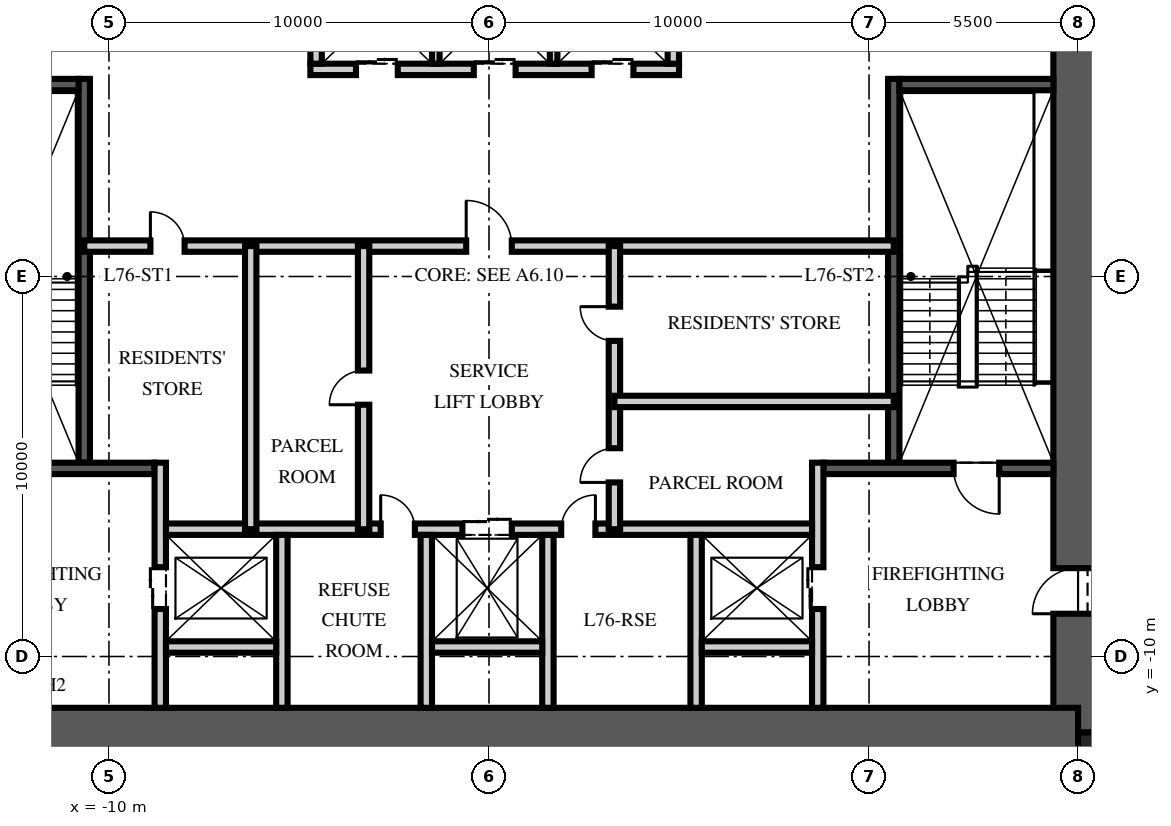
"""IFC4 building model, lengths in metres.
Left out: names, types, materials, properties, quantities, classifications, styles, units other than length and angle.
Written with IfcOpenShell. Run it as: python <this file> out.ifc"""

import sys

from ifc_helpers import new_model, si_unit, direction, frame, frame_2d, origin, origin_2d, place, context, subcontext, project, spatial, rectangle, extrude, element, fill, save


model = new_model("IFC4")
c1 = context("Model", 3, precision=1e-05, world=origin(), true_north=direction((0.0, 1.0)))
c2 = subcontext(c1, "Body", "Model", "MODEL_VIEW")
j1 = project(units=[si_unit("LENGTHUNIT", "METRE"), si_unit("PLANEANGLEUNIT", "RADIAN")], contexts=[c1])
p1 = place(None, origin())
s1 = spatial("IfcSite", under=j1, at=p1, CompositionType="ELEMENT")
p2 = place(p1, origin())
s2 = spatial("IfcBuilding", under=s1, at=p2, CompositionType="ELEMENT")
p3 = place(p2, frame((0.0, 0.0, 304.5)))
s3 = spatial("IfcBuildingStorey", under=s2, at=p3, CompositionType="ELEMENT", Elevation=304.5)
p4 = place(p3, frame((15.5, -12.0, -0.25), z_axis=(0.0, 0.0, 1.0), x_axis=(0.0, 1.0, 0.0)))
e1 = element("IfcWall", 1, at=p4, inside=s3, PredefinedType="SHEAR", context=c2, shape_type="SweptSolid", body=[
    extrude(rectangle(XDim=24.0, YDim=1.3, at=frame_2d((12.0, 0.0))), origin(), (0.0, 0.0, 1.0), 3.75),
])
p5 = place(p4, frame((3.125, 0.0, 0.25)))
e2 = element("IfcOpeningElement", 2, at=p5, cuts=e1, PredefinedType="OPENING", context=c2, shape_type="SweptSolid", body=[
    extrude(rectangle(XDim=1.2, YDim=2.1, at=frame_2d((0.6, 1.05))), frame((0.0, 0.66, 0.0), z_axis=(0.0, -1.0, 0.0), x_axis=(1.0, 0.0, 0.0)), (0.0, 0.0, 1.0), 1.32),
])
p6 = place(p4, frame((19.375, 0.0, 0.25)))
e3 = element("IfcOpeningElement", 3, at=p6, cuts=e1, PredefinedType="OPENING", context=c2, shape_type="SweptSolid", body=[
    extrude(rectangle(XDim=1.8, YDim=2.1, at=frame_2d((0.9, 1.05))), frame((0.0, 0.66, 0.0), z_axis=(0.0, -1.0, 0.0), x_axis=(1.0, 0.0, 0.0)), (0.0, 0.0, 1.0), 1.32),
])
p7 = place(p3, frame((-15.5, -12.0, -0.25), z_axis=(0.0, 0.0, 1.0), x_axis=(1.0, 0.0, 0.0)))
e4 = element("IfcWall", 4, at=p7, inside=s3, PredefinedType="SHEAR", context=c2, shape_type="SweptSolid", body=[
    extrude(rectangle(XDim=31.0, YDim=1.3, at=frame_2d((15.5, 0.0))), origin(), (0.0, 0.0, 1.0), 3.75),
])
p8 = place(p3, frame((15.825, -12.325, -0.25), z_axis=(0.0, 0.0, 1.0), x_axis=(1.0, 0.0, 0.0)))
e5 = element("IfcColumn", 5, at=p8, inside=s3, PredefinedType="COLUMN", context=c2, shape_type="SweptSolid", body=[
    extrude(rectangle(XDim=0.65, YDim=0.65, at=origin_2d()), origin(), (0.0, 0.0, 1.0), 3.75),
])
p9 = place(p3, frame((-10.65, -4.9, 0.0), z_axis=(0.0, 0.0, 1.0), x_axis=(0.0, 1.0, 0.0)))
e6 = element("IfcWall", 6, at=p9, inside=s3, PredefinedType="SOLIDWALL", context=c2, shape_type="SweptSolid", body=[
    extrude(rectangle(XDim=10.1, YDim=0.3, at=frame_2d((5.05, 0.0))), origin(), (0.0, 0.0, 1.0), 3.5),
])
p10 = place(p3, frame((-14.85, -5.05, 0.0), z_axis=(0.0, 0.0, 1.0), x_axis=(1.0, 0.0, 0.0)))
e7 = element("IfcWall", 7, at=p10, inside=s3, PredefinedType="SOLIDWALL", context=c2, shape_type="SweptSolid", body=[
    extrude(rectangle(XDim=6.05, YDim=0.3, at=frame_2d((3.025, 0.0))), origin(), (0.0, 0.0, 1.0), 3.5),
])
p11 = place(p10, frame((1.425, 0.0, 0.0)))
e8 = element("IfcOpeningElement", 8, at=p11, cuts=e7, PredefinedType="OPENING", context=c2, shape_type="SweptSolid", body=[
    extrude(rectangle(XDim=1.2, YDim=2.1, at=frame_2d((0.6, 1.05))), frame((0.0, 0.16, 0.0), z_axis=(0.0, -1.0, 0.0), x_axis=(1.0, 0.0, 0.0)), (0.0, 0.0, 1.0), 0.32),
])
p12 = place(p3, frame((-14.85, 5.05, 0.0), z_axis=(0.0, 0.0, 1.0), x_axis=(1.0, 0.0, 0.0)))
e9 = element("IfcWall", 9, at=p12, inside=s3, PredefinedType="SOLIDWALL", context=c2, shape_type="SweptSolid", body=[
    extrude(rectangle(XDim=4.05, YDim=0.3, at=frame_2d((2.025, 0.0))), origin(), (0.0, 0.0, 1.0), 3.5),
])
p13 = place(p3, frame((-8.65, -11.35, 0.0), z_axis=(0.0, 0.0, 1.0), x_axis=(0.0, 1.0, 0.0)))
e10 = element("IfcWall", 10, at=p13, inside=s3, PredefinedType="PARTITIONING", context=c2, shape_type="SweptSolid", body=[
    extrude(rectangle(XDim=6.45, YDim=0.3, at=frame_2d((3.225, 0.0))), origin(), (0.0, 0.0, 1.0), 3.5),
])
p14 = place(p13, frame((2.6, 0.0, 0.0)))
e11 = element("IfcOpeningElement", 11, at=p14, cuts=e10, PredefinedType="OPENING", context=c2, shape_type="SweptSolid", body=[
    extrude(rectangle(XDim=1.1, YDim=2.1, at=frame_2d((0.55, 1.05))), frame((0.0, 0.16, 0.0), z_axis=(0.0, -1.0, 0.0), x_axis=(1.0, 0.0, 0.0)), (0.0, 0.0, 1.0), 0.32),
])
p15 = place(p3, frame((10.65, -4.9, 0.0), z_axis=(0.0, 0.0, 1.0), x_axis=(0.0, 1.0, 0.0)))
e12 = element("IfcWall", 12, at=p15, inside=s3, PredefinedType="SOLIDWALL", context=c2, shape_type="SweptSolid", body=[
    extrude(rectangle(XDim=10.1, YDim=0.3, at=frame_2d((5.05, 0.0))), origin(), (0.0, 0.0, 1.0), 3.5),
])
p16 = place(p3, frame((14.85, -5.05, 0.0), z_axis=(0.0, 0.0, 1.0), x_axis=(-1.0, 0.0, 0.0)))
e13 = element("IfcWall", 13, at=p16, inside=s3, PredefinedType="SOLIDWALL", context=c2, shape_type="SweptSolid", body=[
    extrude(rectangle(XDim=6.05, YDim=0.3, at=frame_2d((3.025, 0.0))), origin(), (0.0, 0.0, 1.0), 3.5),
])
p17 = place(p16, frame((1.425, 0.0, 0.0)))
e14 = element("IfcOpeningElement", 14, at=p17, cuts=e13, PredefinedType="OPENING", context=c2, shape_type="SweptSolid", body=[
    extrude(rectangle(XDim=1.2, YDim=2.1, at=frame_2d((0.6, 1.05))), frame((0.0, 0.16, 0.0), z_axis=(0.0, -1.0, 0.0), x_axis=(1.0, 0.0, 0.0)), (0.0, 0.0, 1.0), 0.32),
])
p18 = place(p3, frame((14.85, 5.05, 0.0), z_axis=(0.0, 0.0, 1.0), x_axis=(-1.0, 0.0, 0.0)))
e15 = element("IfcWall", 15, at=p18, inside=s3, PredefinedType="SOLIDWALL", context=c2, shape_type="SweptSolid", body=[
    extrude(rectangle(XDim=4.05, YDim=0.3, at=frame_2d((2.025, 0.0))), origin(), (0.0, 0.0, 1.0), 3.5),
])
p19 = place(p3, frame((8.65, -11.35, 0.0), z_axis=(0.0, 0.0, 1.0), x_axis=(0.0, 1.0, 0.0)))
e16 = element("IfcWall", 16, at=p19, inside=s3, PredefinedType="PARTITIONING", context=c2, shape_type="SweptSolid", body=[
    extrude(rectangle(XDim=6.45, YDim=0.3, at=frame_2d((3.225, 0.0))), origin(), (0.0, 0.0, 1.0), 3.5),
])
p20 = place(p19, frame((2.6, 0.0, 0.0)))
e17 = element("IfcOpeningElement", 17, at=p20, cuts=e16, PredefinedType="OPENING", context=c2, shape_type="SweptSolid", body=[
    extrude(rectangle(XDim=1.1, YDim=2.1, at=frame_2d((0.55, 1.05))), frame((0.0, 0.16, 0.0), z_axis=(0.0, -1.0, 0.0), x_axis=(1.0, 0.0, 0.0)), (0.0, 0.0, 1.0), 0.32),
])
p21 = place(p3, frame((-8.5, -6.65, 0.0), z_axis=(0.0, 0.0, 1.0), x_axis=(1.0, 0.0, 0.0)))
e18 = element("IfcWall", 18, at=p21, inside=s3, PredefinedType="PARTITIONING", context=c2, shape_type="SweptSolid", body=[
    extrude(rectangle(XDim=17.0, YDim=0.3, at=frame_2d((8.5, 0.0))), origin(), (0.0, 0.0, 1.0), 3.5),
])
p22 = place(p21, frame((7.8, 0.0, 0.0)))
e19 = element("IfcOpeningElement", 19, at=p22, cuts=e18, PredefinedType="OPENING", context=c2, shape_type="SweptSolid", body=[
    extrude(rectangle(XDim=1.3, YDim=2.4, at=frame_2d((0.65, 1.2))), frame((0.0, 0.16, 0.0), z_axis=(0.0, -1.0, 0.0), x_axis=(1.0, 0.0, 0.0)), (0.0, 0.0, 1.0), 0.32),
])
p23 = place(p21, frame((5.65, 0.0, 0.0)))
e20 = element("IfcOpeningElement", 20, at=p23, cuts=e18, PredefinedType="OPENING", context=c2, shape_type="SweptSolid", body=[
    extrude(rectangle(XDim=0.9, YDim=2.1, at=frame_2d((0.45, 1.05))), frame((0.0, 0.16, 0.0), z_axis=(0.0, -1.0, 0.0), x_axis=(1.0, 0.0, 0.0)), (0.0, 0.0, 1.0), 0.32),
])
p24 = place(p21, frame((10.4, 0.0, 0.0)))
e21 = element("IfcOpeningElement", 21, at=p24, cuts=e18, PredefinedType="OPENING", context=c2, shape_type="SweptSolid", body=[
    extrude(rectangle(XDim=0.9, YDim=2.1, at=frame_2d((0.45, 1.05))), frame((0.0, 0.16, 0.0), z_axis=(0.0, -1.0, 0.0), x_axis=(1.0, 0.0, 0.0)), (0.0, 0.0, 1.0), 0.32),
])
for number, where, z_axis, x_axis in (
    (22, (-5.45, -11.35, 0.0), (0.0, 0.0, 1.0), (0.0, 1.0, 0.0)),
    (23, (-1.65, -11.35, 0.0), (0.0, 0.0, 1.0), (0.0, 1.0, 0.0)),
    (24, (1.55, -11.35, 0.0), (0.0, 0.0, 1.0), (0.0, 1.0, 0.0)),
    (25, (5.45, -11.35, 0.0), (0.0, 0.0, 1.0), (0.0, 1.0, 0.0)),
):
    element("IfcWall", number, at=place(p3, frame(where, z_axis=z_axis, x_axis=x_axis)), inside=s3, PredefinedType="PARTITIONING", context=c2, shape_type="SweptSolid", body=[
        extrude(rectangle(XDim=4.55, YDim=0.3, at=frame_2d((2.275, 0.0))), origin(), (0.0, 0.0, 1.0), 3.5),
    ])
for number, where, z_axis, x_axis in (
    (26, (-8.5, -9.75, 0.0), (0.0, 0.0, 1.0), (1.0, 0.0, 0.0)),
    (27, (-1.5, -9.75, 0.0), (0.0, 0.0, 1.0), (1.0, 0.0, 0.0)),
    (28, (5.6, -9.75, 0.0), (0.0, 0.0, 1.0), (1.0, 0.0, 0.0)),
):
    element("IfcWall", number, at=place(p3, frame(where, z_axis=z_axis, x_axis=x_axis)), inside=s3, PredefinedType="PARTITIONING", context=c2, shape_type="SweptSolid", body=[
        extrude(rectangle(XDim=2.9, YDim=0.3, at=frame_2d((1.45, 0.0))), origin(), (0.0, 0.0, 1.0), 3.5),
    ])
p25 = place(p3, frame((-4.7, 5.45, 0.0), z_axis=(0.0, 0.0, 1.0), x_axis=(1.0, 0.0, 0.0)))
e29 = element("IfcWall", 29, at=p25, inside=s3, PredefinedType="PARTITIONING", context=c2, shape_type="SweptSolid", body=[
    extrude(rectangle(XDim=9.7, YDim=0.3, at=frame_2d((4.85, 0.0))), origin(), (0.0, 0.0, 1.0), 3.5),
])
p26 = place(p25, frame((1.2, 0.0, 0.0)))
e30 = element("IfcOpeningElement", 30, at=p26, cuts=e29, PredefinedType="OPENING", context=c2, shape_type="SweptSolid", body=[
    extrude(rectangle(XDim=1.1, YDim=2.1, at=frame_2d((0.55, 1.05))), frame((0.0, 0.16, 0.0), z_axis=(0.0, -1.0, 0.0), x_axis=(1.0, 0.0, 0.0)), (0.0, 0.0, 1.0), 0.32),
])
p27 = place(p25, frame((4.3, 0.0, 0.0)))
e31 = element("IfcOpeningElement", 31, at=p27, cuts=e29, PredefinedType="OPENING", context=c2, shape_type="SweptSolid", body=[
    extrude(rectangle(XDim=1.1, YDim=2.1, at=frame_2d((0.55, 1.05))), frame((0.0, 0.16, 0.0), z_axis=(0.0, -1.0, 0.0), x_axis=(1.0, 0.0, 0.0)), (0.0, 0.0, 1.0), 0.32),
])
p28 = place(p25, frame((7.4, 0.0, 0.0)))
e32 = element("IfcOpeningElement", 32, at=p28, cuts=e29, PredefinedType="OPENING", context=c2, shape_type="SweptSolid", body=[
    extrude(rectangle(XDim=1.1, YDim=2.1, at=frame_2d((0.55, 1.05))), frame((0.0, 0.16, 0.0), z_axis=(0.0, -1.0, 0.0), x_axis=(1.0, 0.0, 0.0)), (0.0, 0.0, 1.0), 0.32),
])
for number, where, z_axis, x_axis in (
    (33, (-4.55, 5.6, 0.0), (0.0, 0.0, 1.0), (0.0, 1.0, 0.0)),
    (34, (4.85, 5.6, 0.0), (0.0, 0.0, 1.0), (0.0, 1.0, 0.0)),
):
    element("IfcWall", number, at=place(p3, frame(where, z_axis=z_axis, x_axis=x_axis)), inside=s3, PredefinedType="PARTITIONING", context=c2, shape_type="SweptSolid", body=[
        extrude(rectangle(XDim=2.8, YDim=0.3, at=frame_2d((1.4, 0.0))), origin(), (0.0, 0.0, 1.0), 3.5),
    ])
for number, where, z_axis, x_axis in (
    (35, (-1.4, 5.6, 0.0), (0.0, 0.0, 1.0), (0.0, 1.0, 0.0)),
    (36, (1.7, 5.6, 0.0), (0.0, 0.0, 1.0), (0.0, 1.0, 0.0)),
):
    element("IfcWall", number, at=place(p3, frame(where, z_axis=z_axis, x_axis=x_axis)), inside=s3, PredefinedType="PARTITIONING", context=c2, shape_type="SweptSolid", body=[
        extrude(rectangle(XDim=2.8, YDim=0.2, at=frame_2d((1.4, 0.0))), origin(), (0.0, 0.0, 1.0), 3.5),
    ])
p29 = place(p3, frame((-10.65, 0.8, 0.0), z_axis=(0.0, 0.0, 1.0), x_axis=(1.0, 0.0, 0.0)))
e37 = element("IfcWall", 37, at=p29, inside=s3, PredefinedType="PARTITIONING", context=c2, shape_type="SweptSolid", body=[
    extrude(rectangle(XDim=21.3, YDim=0.3, at=frame_2d((10.65, 0.0))), origin(), (0.0, 0.0, 1.0), 3.5),
])
p30 = place(p29, frame((10.05, 0.0, 0.0)))
e38 = element("IfcOpeningElement", 38, at=p30, cuts=e37, PredefinedType="OPENING", context=c2, shape_type="SweptSolid", body=[
    extrude(rectangle(XDim=1.2, YDim=2.1, at=frame_2d((0.6, 1.05))), frame((0.0, 0.16, 0.0), z_axis=(0.0, -1.0, 0.0), x_axis=(1.0, 0.0, 0.0)), (0.0, 0.0, 1.0), 0.32),
])
p31 = place(p29, frame((1.74, 0.0, 0.0)))
e39 = element("IfcOpeningElement", 39, at=p31, cuts=e37, PredefinedType="OPENING", context=c2, shape_type="SweptSolid", body=[
    extrude(rectangle(XDim=0.9, YDim=2.1, at=frame_2d((0.45, 1.05))), frame((0.0, 0.16, 0.0), z_axis=(0.0, -1.0, 0.0), x_axis=(1.0, 0.0, 0.0)), (0.0, 0.0, 1.0), 0.32),
])
p32 = place(p3, frame((-3.3, -6.65, 0.0), z_axis=(0.0, 0.0, 1.0), x_axis=(0.0, 1.0, 0.0)))
e40 = element("IfcWall", 40, at=p32, inside=s3, PredefinedType="PARTITIONING", context=c2, shape_type="SweptSolid", body=[
    extrude(rectangle(XDim=7.45, YDim=0.3, at=frame_2d((3.725, 0.0))), origin(), (0.0, 0.0, 1.0), 3.5),
])
p33 = place(p32, frame((3.275, 0.0, 0.0)))
e41 = element("IfcOpeningElement", 41, at=p33, cuts=e40, PredefinedType="OPENING", context=c2, shape_type="SweptSolid", body=[
    extrude(rectangle(XDim=0.9, YDim=2.1, at=frame_2d((0.45, 1.05))), frame((0.0, 0.16, 0.0), z_axis=(0.0, -1.0, 0.0), x_axis=(1.0, 0.0, 0.0)), (0.0, 0.0, 1.0), 0.32),
])
p34 = place(p3, frame((3.3, -6.65, 0.0), z_axis=(0.0, 0.0, 1.0), x_axis=(0.0, 1.0, 0.0)))
e42 = element("IfcWall", 42, at=p34, inside=s3, PredefinedType="PARTITIONING", context=c2, shape_type="SweptSolid", body=[
    extrude(rectangle(XDim=7.45, YDim=0.3, at=frame_2d((3.725, 0.0))), origin(), (0.0, 0.0, 1.0), 3.5),
])
p35 = place(p34, frame((1.231, 0.0, 0.0)))
e43 = element("IfcOpeningElement", 43, at=p35, cuts=e42, PredefinedType="OPENING", context=c2, shape_type="SweptSolid", body=[
    extrude(rectangle(XDim=0.9, YDim=2.1, at=frame_2d((0.45, 1.05))), frame((0.0, 0.16, 0.0), z_axis=(0.0, -1.0, 0.0), x_axis=(1.0, 0.0, 0.0)), (0.0, 0.0, 1.0), 0.32),
])
p36 = place(p34, frame((4.956, 0.0, 0.0)))
e44 = element("IfcOpeningElement", 44, at=p36, cuts=e42, PredefinedType="OPENING", context=c2, shape_type="SweptSolid", body=[
    extrude(rectangle(XDim=0.9, YDim=2.1, at=frame_2d((0.45, 1.05))), frame((0.0, 0.16, 0.0), z_axis=(0.0, -1.0, 0.0), x_axis=(1.0, 0.0, 0.0)), (0.0, 0.0, 1.0), 0.32),
])
p37 = place(p3, frame((-6.27, -6.65, 0.0), z_axis=(0.0, 0.0, 1.0), x_axis=(0.0, 1.0, 0.0)))
e45 = element("IfcWall", 45, at=p37, inside=s3, PredefinedType="PARTITIONING", context=c2, shape_type="SweptSolid", body=[
    extrude(rectangle(XDim=7.45, YDim=0.3, at=frame_2d((3.725, 0.0))), origin(), (0.0, 0.0, 1.0), 3.5),
])
p38 = place(p3, frame((10.65, -3.288, 0.0), z_axis=(0.0, 0.0, 1.0), x_axis=(-1.0, 0.0, 0.0)))
e46 = element("IfcWall", 46, at=p38, inside=s3, PredefinedType="PARTITIONING", context=c2, shape_type="SweptSolid", body=[
    extrude(rectangle(XDim=7.35, YDim=0.3, at=frame_2d((3.675, 0.0))), origin(), (0.0, 0.0, 1.0), 3.5),
])
p39 = place(p17, origin())
e47 = element("IfcDoor", 47, at=p39, inside=s3, OperationType="SINGLE_SWING_LEFT", PredefinedType="DOOR", context=c2, shape_type="SweptSolid", body=[
    extrude(rectangle(XDim=1.2, YDim=2.1, at=frame_2d((0.6, 1.05))), frame((0.0, 0.025, 0.0), z_axis=(0.0, -1.0, 0.0), x_axis=(1.0, 0.0, 0.0)), (0.0, 0.0, 1.0), 0.05),
])
fill(e14, e47)
p40 = place(p5, origin())
e48 = element("IfcDoor", 48, at=p40, inside=s3, OperationType="SINGLE_SWING_LEFT", PredefinedType="DOOR", context=c2, shape_type="SweptSolid", body=[
    extrude(rectangle(XDim=1.2, YDim=2.1, at=frame_2d((0.6, 1.05))), frame((0.0, 0.025, 0.0), z_axis=(0.0, -1.0, 0.0), x_axis=(1.0, 0.0, 0.0)), (0.0, 0.0, 1.0), 0.05),
])
fill(e2, e48)
p41 = place(p14, origin())
e49 = element("IfcDoor", 49, at=p41, inside=s3, OperationType="DOUBLE_DOOR_SLIDING", PredefinedType="DOOR", context=c2, shape_type="SweptSolid", body=[
    extrude(rectangle(XDim=1.1, YDim=2.1, at=frame_2d((0.55, 1.05))), frame((0.0, 0.025, 0.0), z_axis=(0.0, -1.0, 0.0), x_axis=(1.0, 0.0, 0.0)), (0.0, 0.0, 1.0), 0.05),
])
fill(e11, e49)
p42 = place(p20, origin())
e50 = element("IfcDoor", 50, at=p42, inside=s3, OperationType="DOUBLE_DOOR_SLIDING", PredefinedType="DOOR", context=c2, shape_type="SweptSolid", body=[
    extrude(rectangle(XDim=1.1, YDim=2.1, at=frame_2d((0.55, 1.05))), frame((0.0, 0.025, 0.0), z_axis=(0.0, -1.0, 0.0), x_axis=(1.0, 0.0, 0.0)), (0.0, 0.0, 1.0), 0.05),
])
fill(e17, e50)
p43 = place(p26, origin())
e51 = element("IfcDoor", 51, at=p43, inside=s3, OperationType="DOUBLE_DOOR_SLIDING", PredefinedType="DOOR", context=c2, shape_type="SweptSolid", body=[
    extrude(rectangle(XDim=1.1, YDim=2.1, at=frame_2d((0.55, 1.05))), frame((0.0, 0.025, 0.0), z_axis=(0.0, -1.0, 0.0), x_axis=(1.0, 0.0, 0.0)), (0.0, 0.0, 1.0), 0.05),
])
fill(e30, e51)
p44 = place(p27, origin())
e52 = element("IfcDoor", 52, at=p44, inside=s3, OperationType="DOUBLE_DOOR_SLIDING", PredefinedType="DOOR", context=c2, shape_type="SweptSolid", body=[
    extrude(rectangle(XDim=1.1, YDim=2.1, at=frame_2d((0.55, 1.05))), frame((0.0, 0.025, 0.0), z_axis=(0.0, -1.0, 0.0), x_axis=(1.0, 0.0, 0.0)), (0.0, 0.0, 1.0), 0.05),
])
fill(e31, e52)
p45 = place(p28, origin())
e53 = element("IfcDoor", 53, at=p45, inside=s3, OperationType="DOUBLE_DOOR_SLIDING", PredefinedType="DOOR", context=c2, shape_type="SweptSolid", body=[
    extrude(rectangle(XDim=1.1, YDim=2.1, at=frame_2d((0.55, 1.05))), frame((0.0, 0.025, 0.0), z_axis=(0.0, -1.0, 0.0), x_axis=(1.0, 0.0, 0.0)), (0.0, 0.0, 1.0), 0.05),
])
fill(e32, e53)
p46 = place(p22, origin())
e54 = element("IfcDoor", 54, at=p46, inside=s3, OperationType="DOUBLE_DOOR_SLIDING", PredefinedType="DOOR", context=c2, shape_type="SweptSolid", body=[
    extrude(rectangle(XDim=1.3, YDim=2.4, at=frame_2d((0.65, 1.2))), frame((0.0, 0.025, 0.0), z_axis=(0.0, -1.0, 0.0), x_axis=(1.0, 0.0, 0.0)), (0.0, 0.0, 1.0), 0.05),
])
fill(e19, e54)
p47 = place(p30, origin())
e55 = element("IfcDoor", 55, at=p47, inside=s3, OperationType="SINGLE_SWING_LEFT", PredefinedType="DOOR", context=c2, shape_type="SweptSolid", body=[
    extrude(rectangle(XDim=1.2, YDim=2.1, at=frame_2d((0.6, 1.05))), frame((0.0, 0.025, 0.0), z_axis=(0.0, -1.0, 0.0), x_axis=(1.0, 0.0, 0.0)), (0.0, 0.0, 1.0), 0.05),
])
fill(e38, e55)
p48 = place(p23, origin())
e56 = element("IfcDoor", 56, at=p48, inside=s3, OperationType="SINGLE_SWING_LEFT", PredefinedType="DOOR", context=c2, shape_type="SweptSolid", body=[
    extrude(rectangle(XDim=0.9, YDim=2.1, at=frame_2d((0.45, 1.05))), frame((0.0, 0.025, 0.0), z_axis=(0.0, -1.0, 0.0), x_axis=(1.0, 0.0, 0.0)), (0.0, 0.0, 1.0), 0.05),
])
fill(e20, e56)
p49 = place(p24, origin())
e57 = element("IfcDoor", 57, at=p49, inside=s3, OperationType="SINGLE_SWING_RIGHT", PredefinedType="DOOR", context=c2, shape_type="SweptSolid", body=[
    extrude(rectangle(XDim=0.9, YDim=2.1, at=frame_2d((0.45, 1.05))), frame((0.0, 0.025, 0.0), z_axis=(0.0, -1.0, 0.0), x_axis=(1.0, 0.0, 0.0)), (0.0, 0.0, 1.0), 0.05),
])
fill(e21, e57)
p50 = place(p33, origin())
e58 = element("IfcDoor", 58, at=p50, inside=s3, OperationType="SINGLE_SWING_LEFT", PredefinedType="DOOR", context=c2, shape_type="SweptSolid", body=[
    extrude(rectangle(XDim=0.9, YDim=2.1, at=frame_2d((0.45, 1.05))), frame((0.0, 0.025, 0.0), z_axis=(0.0, -1.0, 0.0), x_axis=(1.0, 0.0, 0.0)), (0.0, 0.0, 1.0), 0.05),
])
fill(e41, e58)
p51 = place(p31, origin())
e59 = element("IfcDoor", 59, at=p51, inside=s3, OperationType="SINGLE_SWING_LEFT", PredefinedType="DOOR", context=c2, shape_type="SweptSolid", body=[
    extrude(rectangle(XDim=0.9, YDim=2.1, at=frame_2d((0.45, 1.05))), frame((0.0, 0.025, 0.0), z_axis=(0.0, -1.0, 0.0), x_axis=(1.0, 0.0, 0.0)), (0.0, 0.0, 1.0), 0.05),
])
fill(e39, e59)
p52 = place(p35, origin())
e60 = element("IfcDoor", 60, at=p52, inside=s3, OperationType="SINGLE_SWING_LEFT", PredefinedType="DOOR", context=c2, shape_type="SweptSolid", body=[
    extrude(rectangle(XDim=0.9, YDim=2.1, at=frame_2d((0.45, 1.05))), frame((0.0, 0.025, 0.0), z_axis=(0.0, -1.0, 0.0), x_axis=(1.0, 0.0, 0.0)), (0.0, 0.0, 1.0), 0.05),
])
fill(e43, e60)
p53 = place(p36, origin())
e61 = element("IfcDoor", 61, at=p53, inside=s3, OperationType="SINGLE_SWING_RIGHT", PredefinedType="DOOR", context=c2, shape_type="SweptSolid", body=[
    extrude(rectangle(XDim=0.9, YDim=2.1, at=frame_2d((0.45, 1.05))), frame((0.0, 0.025, 0.0), z_axis=(0.0, -1.0, 0.0), x_axis=(1.0, 0.0, 0.0)), (0.0, 0.0, 1.0), 0.05),
])
fill(e44, e61)
save(model, sys.argv[1])
